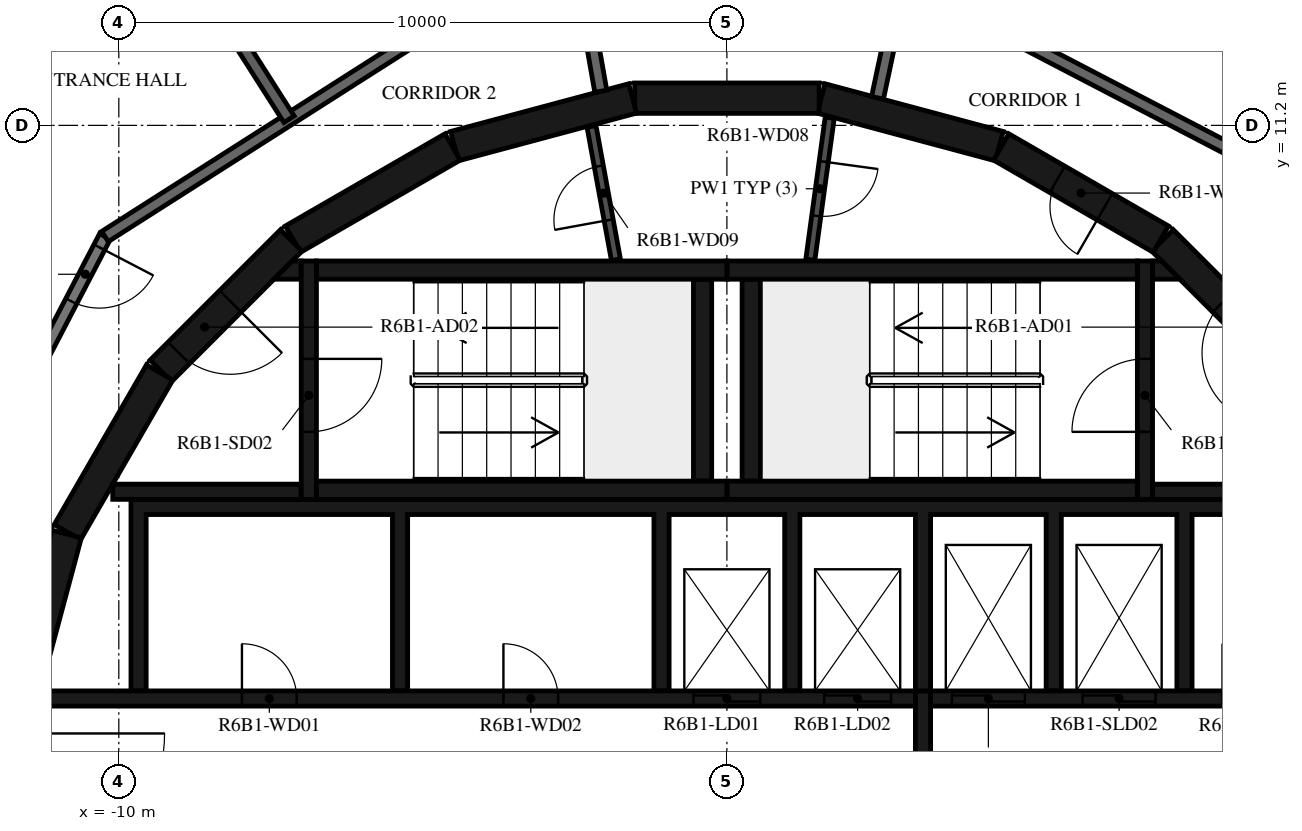
"""IFC4 building model, lengths in metres.
Left out: names, types, materials, properties, quantities, classifications, styles, units other than length and angle.
Written with IfcOpenShell. Run it as: python <this file> out.ifc"""

import sys

from ifc_helpers import new_model, si_unit, direction, frame, frame_2d, origin, place, context, subcontext, project, spatial, polyline, rectangle, outline, extrude, element, fill, save


model = new_model("IFC4")
c1 = context("Model", 3, precision=1e-05, world=origin(), true_north=direction((0.0, 1.0)))
c2 = subcontext(c1, "Body", "Model", "MODEL_VIEW")
j1 = project(units=[si_unit("LENGTHUNIT", "METRE"), si_unit("PLANEANGLEUNIT", "RADIAN")], contexts=[c1])
p1 = place(None, origin())
s1 = spatial("IfcSite", under=j1, at=p1, CompositionType="ELEMENT")
p2 = place(p1, origin())
s2 = spatial("IfcBuilding", under=s1, at=p2, CompositionType="ELEMENT")
p3 = place(p2, frame((0.0, 0.0, 237.2)))
s3 = spatial("IfcBuildingStorey", under=s2, at=p3, CompositionType="ELEMENT", Elevation=237.2)
p4 = place(p3, frame((9.308, 7.164, 0.0), z_axis=(0.0, 0.0, 1.0), x_axis=(-0.707106781187, 0.707106781187, 0.0)))
e1 = element("IfcWall", 1, at=p4, inside=s3, PredefinedType="SHEAR", context=c2, shape_type="SweptSolid", body=[
    extrude(rectangle(XDim=3.032, YDim=0.5, at=frame_2d((1.516, 0.0))), origin(), (0.0, 0.0, 1.0), 3.12),
])
p5 = place(p4, frame((0.416, 0.0, 0.0)))
e2 = element("IfcOpeningElement", 2, at=p5, cuts=e1, PredefinedType="OPENING", context=c2, shape_type="SweptSolid", body=[
    extrude(rectangle(XDim=1.2, YDim=2.1, at=frame_2d((0.6, 1.05))), frame((0.0, 0.26, 0.0), z_axis=(0.0, -1.0, 0.0), x_axis=(1.0, 0.0, 0.0)), (0.0, 0.0, 1.0), 0.52),
])
p6 = place(p3, frame((7.137, 9.329, 0.0), z_axis=(0.0, 0.0, 1.0), x_axis=(-0.865975092491, 0.500087131594, 0.0)))
e3 = element("IfcWall", 3, at=p6, inside=s3, PredefinedType="SHEAR", context=c2, shape_type="SweptSolid", body=[
    extrude(rectangle(XDim=3.033, YDim=0.5, at=frame_2d((1.516, 0.0))), origin(), (0.0, 0.0, 1.0), 3.12),
])
p7 = place(p6, frame((1.066, 0.0, 0.0)))
e4 = element("IfcOpeningElement", 4, at=p7, cuts=e3, PredefinedType="OPENING", context=c2, shape_type="SweptSolid", body=[
    extrude(rectangle(XDim=0.9, YDim=2.1, at=frame_2d((0.45, 1.05))), frame((0.0, 0.26, 0.0), z_axis=(0.0, -1.0, 0.0), x_axis=(1.0, 0.0, 0.0)), (0.0, 0.0, 1.0), 0.52),
])
for number, where, z_axis, x_axis in (
    (5, (4.479, 10.858, 0.0), (0.0, 0.0, 1.0), (-0.966, 0.259, 0.0)),
    (6, (1.516, 11.647, 0.0), (0.0, 0.0, 1.0), (-1.0, 0.0, 0.0)),
    (7, (-1.55, 11.643, 0.0), (0.0, 0.0, 1.0), (-0.966, -0.259, 0.0)),
    (8, (-4.51, 10.845, 0.0), (0.0, 0.0, 1.0), (-0.866, -0.5, 0.0)),
):
    element("IfcWall", number, at=place(p3, frame(where, z_axis=z_axis, x_axis=x_axis)), inside=s3, PredefinedType="SHEAR", context=c2, shape_type="SweptSolid", body=[
        extrude(rectangle(XDim=3.033, YDim=0.5, at=frame_2d((1.516, 0.0))), origin(), (0.0, 0.0, 1.0), 3.12),
    ])
p8 = place(p3, frame((-7.164, 9.308, 0.0), z_axis=(0.0, 0.0, 1.0), x_axis=(-0.707106781187, -0.707106781187, 0.0)))
e9 = element("IfcWall", 9, at=p8, inside=s3, PredefinedType="SHEAR", context=c2, shape_type="SweptSolid", body=[
    extrude(rectangle(XDim=3.032, YDim=0.5, at=frame_2d((1.516, 0.0))), origin(), (0.0, 0.0, 1.0), 3.12),
])
p9 = place(p8, frame((1.416, 0.0, 0.0)))
e10 = element("IfcOpeningElement", 10, at=p9, cuts=e9, PredefinedType="OPENING", context=c2, shape_type="SweptSolid", body=[
    extrude(rectangle(XDim=1.2, YDim=2.1, at=frame_2d((0.6, 1.05))), frame((0.0, 0.26, 0.0), z_axis=(0.0, -1.0, 0.0), x_axis=(1.0, 0.0, 0.0)), (0.0, 0.0, 1.0), 0.52),
])
for number, where, z_axis, x_axis in (
    (11, (-9.329, 7.137, 0.0), (0.0, 0.0, 1.0), (-0.5, -0.866, 0.0)),
    (12, (-10.858, 4.479, 0.0), (0.0, 0.0, 1.0), (-0.259, -0.966, 0.0)),
):
    element("IfcWall", number, at=place(p3, frame(where, z_axis=z_axis, x_axis=x_axis)), inside=s3, PredefinedType="SHEAR", context=c2, shape_type="SweptSolid", body=[
        extrude(rectangle(XDim=3.033, YDim=0.5, at=frame_2d((1.516, 0.0))), origin(), (0.0, 0.0, 1.0), 3.12),
    ])
for number, where, z_axis, x_axis in (
    (13, (0.0, 5.2, 0.0), (0.0, 0.0, 1.0), (1.0, 0.0, 0.0)),
    (14, (0.0, 8.82, 0.0), (0.0, 0.0, 1.0), (1.0, 0.0, 0.0)),
):
    element("IfcWall", number, at=place(p3, frame(where, z_axis=z_axis, x_axis=x_axis)), inside=s3, PredefinedType="SHEAR", context=c2, shape_type="SweptSolid", body=[
        extrude(rectangle(XDim=6.75, YDim=0.3, at=frame_2d((3.375, 0.0))), origin(), (0.0, 0.0, 1.0), 3.12),
    ])
p10 = place(p3, frame((0.4, 5.35, 0.0), z_axis=(0.0, 0.0, 1.0), x_axis=(0.0, 1.0, 0.0)))
e15 = element("IfcWall", 15, at=p10, inside=s3, PredefinedType="SHEAR", context=c2, shape_type="SweptSolid", body=[
    extrude(rectangle(XDim=3.32, YDim=0.3, at=frame_2d((1.66, 0.0))), origin(), (0.0, 0.0, 1.0), 3.12),
])
p11 = place(p3, frame((6.875, 5.05, 0.0), z_axis=(0.0, 0.0, 1.0), x_axis=(0.0, 1.0, 0.0)))
e16 = element("IfcWall", 16, at=p11, inside=s3, PredefinedType="SHEAR", context=c2, shape_type="SweptSolid", body=[
    extrude(rectangle(XDim=3.92, YDim=0.25, at=frame_2d((1.96, 0.0))), origin(), (0.0, 0.0, 1.0), 3.12),
])
p12 = place(p11, frame((1.11, 0.0, 0.0)))
e17 = element("IfcOpeningElement", 17, at=p12, cuts=e16, PredefinedType="OPENING", context=c2, shape_type="SweptSolid", body=[
    extrude(rectangle(XDim=1.2, YDim=2.1, at=frame_2d((0.6, 1.05))), frame((0.0, 0.135, 0.0), z_axis=(0.0, -1.0, 0.0), x_axis=(1.0, 0.0, 0.0)), (0.0, 0.0, 1.0), 0.27),
])
p13 = place(p3, frame((7.0, 5.175, 0.0), z_axis=(0.0, 0.0, 1.0), x_axis=(1.0, 0.0, 0.0)))
e18 = element("IfcWall", 18, at=p13, inside=s3, PredefinedType="SHEAR", context=c2, shape_type="SweptSolid", body=[
    extrude(rectangle(XDim=3.1, YDim=0.25, at=frame_2d((1.55, 0.0))), origin(), (0.0, 0.0, 1.0), 3.12),
])
p14 = place(p3, origin())
e19 = element("IfcWall", 19, at=p14, inside=s3, PredefinedType="SHEAR", context=c2, shape_type="SweptSolid", body=[
    extrude(outline(polyline([(7.448, 8.67), (7.0, 8.67), (7.0, 8.97), (7.148, 8.97), (7.448, 8.67)])), origin(), (0.0, 0.0, 1.0), 3.12),
])
for number, where, z_axis, x_axis in (
    (20, (-6.75, 5.2, 0.0), (0.0, 0.0, 1.0), (1.0, 0.0, 0.0)),
    (21, (-6.75, 8.82, 0.0), (0.0, 0.0, 1.0), (1.0, 0.0, 0.0)),
):
    element("IfcWall", number, at=place(p3, frame(where, z_axis=z_axis, x_axis=x_axis)), inside=s3, PredefinedType="SHEAR", context=c2, shape_type="SweptSolid", body=[
        extrude(rectangle(XDim=6.75, YDim=0.3, at=frame_2d((3.375, 0.0))), origin(), (0.0, 0.0, 1.0), 3.12),
    ])
p15 = place(p3, frame((-0.4, 5.35, 0.0), z_axis=(0.0, 0.0, 1.0), x_axis=(0.0, 1.0, 0.0)))
e22 = element("IfcWall", 22, at=p15, inside=s3, PredefinedType="SHEAR", context=c2, shape_type="SweptSolid", body=[
    extrude(rectangle(XDim=3.32, YDim=0.3, at=frame_2d((1.66, 0.0))), origin(), (0.0, 0.0, 1.0), 3.12),
])
p16 = place(p3, frame((-6.875, 8.97, 0.0), z_axis=(0.0, 0.0, 1.0), x_axis=(0.0, -1.0, 0.0)))
e23 = element("IfcWall", 23, at=p16, inside=s3, PredefinedType="SHEAR", context=c2, shape_type="SweptSolid", body=[
    extrude(rectangle(XDim=3.92, YDim=0.25, at=frame_2d((1.96, 0.0))), origin(), (0.0, 0.0, 1.0), 3.12),
])
p17 = place(p16, frame((1.61, 0.0, 0.0)))
e24 = element("IfcOpeningElement", 24, at=p17, cuts=e23, PredefinedType="OPENING", context=c2, shape_type="SweptSolid", body=[
    extrude(rectangle(XDim=1.2, YDim=2.1, at=frame_2d((0.6, 1.05))), frame((0.0, 0.135, 0.0), z_axis=(0.0, -1.0, 0.0), x_axis=(1.0, 0.0, 0.0)), (0.0, 0.0, 1.0), 0.27),
])
p18 = place(p3, frame((-7.0, 5.175, 0.0), z_axis=(0.0, 0.0, 1.0), x_axis=(-1.0, 0.0, 0.0)))
e25 = element("IfcWall", 25, at=p18, inside=s3, PredefinedType="SHEAR", context=c2, shape_type="SweptSolid", body=[
    extrude(rectangle(XDim=3.1, YDim=0.25, at=frame_2d((1.55, 0.0))), origin(), (0.0, 0.0, 1.0), 3.12),
])
p19 = place(p3, origin())
e26 = element("IfcWall", 26, at=p19, inside=s3, PredefinedType="SHEAR", context=c2, shape_type="SweptSolid", body=[
    extrude(outline(polyline([(-7.148, 8.97), (-7.0, 8.97), (-7.0, 8.67), (-7.448, 8.67), (-7.148, 8.97)])), origin(), (0.0, 0.0, 1.0), 3.12),
])
p20 = place(p3, origin())
e27 = element("IfcWall", 27, at=p20, inside=s3, PredefinedType="SHEAR", context=c2, shape_type="SweptSolid", body=[
    extrude(outline(polyline([(-9.55, 4.8), (-5.5, 4.8), (-5.5, 1.9), (-5.25, 1.9), (-5.25, 4.8), (-1.2, 4.8), (-1.2, 1.9), (-0.95, 1.9), (-0.95, 4.8), (0.95, 4.8), (0.95, 1.9), (1.2, 1.9), (1.2, 4.8), (3.1, 4.8), (3.1, 1.9), (3.35, 1.9), (3.35, 4.8), (5.25, 4.8), (5.25, 1.9), (5.5, 1.9), (5.5, 4.8), (7.4, 4.8), (7.4, 1.9), (7.65, 1.9), (7.65, 4.8), (9.55, 4.8), (9.55, 1.9), (9.8, 1.9), (9.8, 4.8), (9.8, 5.05), (-9.8, 5.05), (-9.8, 4.8), (-9.8, 1.9), (-9.55, 1.9), (-9.55, 4.8)])), origin(), (0.0, 0.0, 1.0), 3.12),
])
p21 = place(p3, frame((-11.28, 1.775, 0.0), z_axis=(0.0, 0.0, 1.0), x_axis=(1.0, 0.0, 0.0)))
e28 = element("IfcWall", 28, at=p21, inside=s3, PredefinedType="SHEAR", context=c2, shape_type="SweptSolid", body=[
    extrude(rectangle(XDim=14.38, YDim=0.25, at=frame_2d((7.19, 0.0))), origin(), (0.0, 0.0, 1.0), 3.12),
])
p22 = place(p21, frame((10.73, 0.0, 0.0)))
e29 = element("IfcOpeningElement", 29, at=p22, cuts=e28, PredefinedType="OPENING", context=c2, shape_type="SweptSolid", body=[
    extrude(rectangle(XDim=1.1, YDim=2.1, at=frame_2d((0.55, 1.05))), frame((0.0, 0.135, 0.0), z_axis=(0.0, -1.0, 0.0), x_axis=(1.0, 0.0, 0.0)), (0.0, 0.0, 1.0), 0.27),
])
p23 = place(p21, frame((12.88, 0.0, 0.0)))
e30 = element("IfcOpeningElement", 30, at=p23, cuts=e28, PredefinedType="OPENING", context=c2, shape_type="SweptSolid", body=[
    extrude(rectangle(XDim=1.1, YDim=2.1, at=frame_2d((0.55, 1.05))), frame((0.0, 0.135, 0.0), z_axis=(0.0, -1.0, 0.0), x_axis=(1.0, 0.0, 0.0)), (0.0, 0.0, 1.0), 0.27),
])
p24 = place(p21, frame((3.305, 0.0, 0.0)))
e31 = element("IfcOpeningElement", 31, at=p24, cuts=e28, PredefinedType="OPENING", context=c2, shape_type="SweptSolid", body=[
    extrude(rectangle(XDim=0.9, YDim=2.1, at=frame_2d((0.45, 1.05))), frame((0.0, 0.135, 0.0), z_axis=(0.0, -1.0, 0.0), x_axis=(1.0, 0.0, 0.0)), (0.0, 0.0, 1.0), 0.27),
])
p25 = place(p21, frame((7.605, 0.0, 0.0)))
e32 = element("IfcOpeningElement", 32, at=p25, cuts=e28, PredefinedType="OPENING", context=c2, shape_type="SweptSolid", body=[
    extrude(rectangle(XDim=0.9, YDim=2.1, at=frame_2d((0.45, 1.05))), frame((0.0, 0.135, 0.0), z_axis=(0.0, -1.0, 0.0), x_axis=(1.0, 0.0, 0.0)), (0.0, 0.0, 1.0), 0.27),
])
p26 = place(p3, frame((3.35, 1.775, 0.0), z_axis=(0.0, 0.0, 1.0), x_axis=(1.0, 0.0, 0.0)))
e33 = element("IfcWall", 33, at=p26, inside=s3, PredefinedType="SHEAR", context=c2, shape_type="SweptSolid", body=[
    extrude(rectangle(XDim=7.93, YDim=0.25, at=frame_2d((3.965, 0.0))), origin(), (0.0, 0.0, 1.0), 3.12),
])
p27 = place(p26, frame((0.35, 0.0, 0.0)))
e34 = element("IfcOpeningElement", 34, at=p27, cuts=e33, PredefinedType="OPENING", context=c2, shape_type="SweptSolid", body=[
    extrude(rectangle(XDim=1.2, YDim=2.4, at=frame_2d((0.6, 1.2))), frame((0.0, 0.135, 0.0), z_axis=(0.0, -1.0, 0.0), x_axis=(1.0, 0.0, 0.0)), (0.0, 0.0, 1.0), 0.27),
])
p28 = place(p26, frame((2.5, 0.0, 0.0)))
e35 = element("IfcOpeningElement", 35, at=p28, cuts=e33, PredefinedType="OPENING", context=c2, shape_type="SweptSolid", body=[
    extrude(rectangle(XDim=1.2, YDim=2.4, at=frame_2d((0.6, 1.2))), frame((0.0, 0.135, 0.0), z_axis=(0.0, -1.0, 0.0), x_axis=(1.0, 0.0, 0.0)), (0.0, 0.0, 1.0), 0.27),
])
p29 = place(p26, frame((4.8, 0.0, 0.0)))
e36 = element("IfcOpeningElement", 36, at=p29, cuts=e33, PredefinedType="OPENING", context=c2, shape_type="SweptSolid", body=[
    extrude(rectangle(XDim=0.9, YDim=2.1, at=frame_2d((0.45, 1.05))), frame((0.0, 0.135, 0.0), z_axis=(0.0, -1.0, 0.0), x_axis=(1.0, 0.0, 0.0)), (0.0, 0.0, 1.0), 0.27),
])
p30 = place(p3, frame((3.225, -1.9, 0.0), z_axis=(0.0, 0.0, 1.0), x_axis=(0.0, 1.0, 0.0)))
e37 = element("IfcWall", 37, at=p30, inside=s3, PredefinedType="SHEAR", context=c2, shape_type="SweptSolid", body=[
    extrude(rectangle(XDim=3.8, YDim=0.25, at=frame_2d((1.9, 0.0))), origin(), (0.0, 0.0, 1.0), 3.12),
])
p31 = place(p3, frame((1.691, 11.326, 0.0), z_axis=(0.0, 0.0, 1.0), x_axis=(-0.135344253201, -0.990798633994, 0.0)))
e38 = element("IfcWall", 38, at=p31, inside=s3, PredefinedType="PARTITIONING", context=c2, shape_type="SweptSolid", body=[
    extrude(rectangle(XDim=2.358, YDim=0.15, at=frame_2d((1.179, 0.0))), origin(), (0.0, 0.0, 1.0), 3.12),
])
p32 = place(p31, frame((0.729, 0.0, 0.0)))
e39 = element("IfcOpeningElement", 39, at=p32, cuts=e38, PredefinedType="OPENING", context=c2, shape_type="SweptSolid", body=[
    extrude(rectangle(XDim=0.9, YDim=2.1, at=frame_2d((0.45, 1.05))), frame((0.0, 0.085, 0.0), z_axis=(0.0, -1.0, 0.0), x_axis=(1.0, 0.0, 0.0)), (0.0, 0.0, 1.0), 0.17),
])
p33 = place(p3, frame((-1.825, 8.99, 0.0), z_axis=(0.0, 0.0, 1.0), x_axis=(-0.179955206115, 0.983674805915, 0.0)))
e40 = element("IfcWall", 40, at=p33, inside=s3, PredefinedType="PARTITIONING", context=c2, shape_type="SweptSolid", body=[
    extrude(rectangle(XDim=2.229, YDim=0.15, at=frame_2d((1.115, 0.0))), origin(), (0.0, 0.0, 1.0), 3.12),
])
p34 = place(p33, frame((0.665, 0.0, 0.0)))
e41 = element("IfcOpeningElement", 41, at=p34, cuts=e40, PredefinedType="OPENING", context=c2, shape_type="SweptSolid", body=[
    extrude(rectangle(XDim=0.9, YDim=2.1, at=frame_2d((0.45, 1.05))), frame((0.0, 0.085, 0.0), z_axis=(0.0, -1.0, 0.0), x_axis=(1.0, 0.0, 0.0)), (0.0, 0.0, 1.0), 0.17),
])
p35 = place(p3, frame((9.372, 10.228, 0.0), z_axis=(0.0, 0.0, 1.0), x_axis=(-0.887005184532, 0.461759464021, 0.0)))
e42 = element("IfcWall", 42, at=p35, inside=s3, PredefinedType="STANDARD", context=c2, shape_type="SweptSolid", body=[
    extrude(rectangle(XDim=7.181, YDim=0.2, at=frame_2d((3.591, 0.0))), origin(), (0.0, 0.0, 1.0), 3.12),
])
p36 = place(p3, frame((2.878, 13.538, 0.0), z_axis=(0.0, 0.0, 1.0), x_axis=(-0.207893604596, -0.978151444904, 0.0)))
e43 = element("IfcWall", 43, at=p36, inside=s3, PredefinedType="STANDARD", context=c2, shape_type="SweptSolid", body=[
    extrude(rectangle(XDim=1.927, YDim=0.2, at=frame_2d((0.963, 0.0))), origin(), (0.0, 0.0, 1.0), 3.12),
])
p37 = place(p3, frame((-10.228, 9.372, 0.0), z_axis=(0.0, 0.0, 1.0), x_axis=(-0.461759464021, -0.887005184532, 0.0)))
e44 = element("IfcWall", 44, at=p37, inside=s3, PredefinedType="STANDARD", context=c2, shape_type="SweptSolid", body=[
    extrude(rectangle(XDim=7.181, YDim=0.2, at=frame_2d((3.591, 0.0))), origin(), (0.0, 0.0, 1.0), 3.12),
])
p38 = place(p37, frame((0.2, 0.0, 0.0)))
e45 = element("IfcOpeningElement", 45, at=p38, cuts=e44, PredefinedType="OPENING", context=c2, shape_type="SweptSolid", body=[
    extrude(rectangle(XDim=1.0, YDim=2.1, at=frame_2d((0.5, 1.05))), frame((0.0, 0.11, 0.0), z_axis=(0.0, -1.0, 0.0), x_axis=(1.0, 0.0, 0.0)), (0.0, 0.0, 1.0), 0.22),
])
p39 = place(p3, frame((-2.074, 11.761, 0.0), z_axis=(0.0, 0.0, 1.0), x_axis=(-0.173679082312, 0.984802303189, 0.0)))
e46 = element("IfcWall", 46, at=p39, inside=s3, PredefinedType="STANDARD", context=c2, shape_type="SweptSolid", body=[
    extrude(rectangle(XDim=1.573, YDim=0.2, at=frame_2d((0.787, 0.0))), origin(), (0.0, 0.0, 1.0), 3.12),
])
p40 = place(p3, frame((-4.172, 13.231, 0.0), z_axis=(0.0, 0.0, 1.0), x_axis=(-0.843388394728, -0.537304397561, 0.0)))
e47 = element("IfcWall", 47, at=p40, inside=s3, PredefinedType="STANDARD", context=c2, shape_type="SweptSolid", body=[
    extrude(rectangle(XDim=7.181, YDim=0.2, at=frame_2d((3.59, 0.0))), origin(), (0.0, 0.0, 1.0), 3.12),
])
p41 = place(p3, frame((-9.645, 15.138, 0.0), z_axis=(0.0, 0.0, 1.0), x_axis=(0.537267800866, -0.84341170857, 0.0)))
e48 = element("IfcWall", 48, at=p41, inside=s3, PredefinedType="STANDARD", context=c2, shape_type="SweptSolid", body=[
    extrude(rectangle(XDim=4.55, YDim=0.2, at=frame_2d((2.275, 0.0))), origin(), (0.0, 0.0, 1.0), 3.12),
])
p42 = place(p3, frame((10.421, 11.373, 0.0), z_axis=(0.0, 0.0, 1.0), x_axis=(-0.887012970857, 0.461744506769, 0.0)))
e49 = element("IfcWall", 49, at=p42, inside=s3, PredefinedType="PARTITIONING", context=c2, shape_type="SweptSolid", body=[
    extrude(rectangle(XDim=7.985, YDim=0.12, at=frame_2d((3.992, 0.0))), origin(), (0.0, 0.0, 1.0), 3.12),
])
p43 = place(p12, origin())
e50 = element("IfcDoor", 50, at=p43, inside=s3, OperationType="SINGLE_SWING_LEFT", PredefinedType="DOOR", context=c2, shape_type="SweptSolid", body=[
    extrude(rectangle(XDim=1.2, YDim=2.1, at=frame_2d((0.6, 1.05))), frame((0.0, 0.025, 0.0), z_axis=(0.0, -1.0, 0.0), x_axis=(1.0, 0.0, 0.0)), (0.0, 0.0, 1.0), 0.05),
])
fill(e17, e50)
p44 = place(p5, origin())
e51 = element("IfcDoor", 51, at=p44, inside=s3, OperationType="SINGLE_SWING_RIGHT", PredefinedType="DOOR", context=c2, shape_type="SweptSolid", body=[
    extrude(rectangle(XDim=1.2, YDim=2.1, at=frame_2d((0.6, 1.05))), frame((0.0, 0.025, 0.0), z_axis=(0.0, -1.0, 0.0), x_axis=(1.0, 0.0, 0.0)), (0.0, 0.0, 1.0), 0.05),
])
fill(e2, e51)
p45 = place(p17, origin())
e52 = element("IfcDoor", 52, at=p45, inside=s3, OperationType="SINGLE_SWING_LEFT", PredefinedType="DOOR", context=c2, shape_type="SweptSolid", body=[
    extrude(rectangle(XDim=1.2, YDim=2.1, at=frame_2d((0.6, 1.05))), frame((0.0, 0.025, 0.0), z_axis=(0.0, -1.0, 0.0), x_axis=(1.0, 0.0, 0.0)), (0.0, 0.0, 1.0), 0.05),
])
fill(e24, e52)
p46 = place(p9, origin())
e53 = element("IfcDoor", 53, at=p46, inside=s3, OperationType="SINGLE_SWING_RIGHT", PredefinedType="DOOR", context=c2, shape_type="SweptSolid", body=[
    extrude(rectangle(XDim=1.2, YDim=2.1, at=frame_2d((0.6, 1.05))), frame((0.0, 0.025, 0.0), z_axis=(0.0, -1.0, 0.0), x_axis=(1.0, 0.0, 0.0)), (0.0, 0.0, 1.0), 0.05),
])
fill(e10, e53)
p47 = place(p22, origin())
e54 = element("IfcDoor", 54, at=p47, inside=s3, OperationType="DOUBLE_DOOR_SLIDING", PredefinedType="DOOR", context=c2, shape_type="SweptSolid", body=[
    extrude(rectangle(XDim=1.1, YDim=2.1, at=frame_2d((0.55, 1.05))), frame((0.0, 0.025, 0.0), z_axis=(0.0, -1.0, 0.0), x_axis=(1.0, 0.0, 0.0)), (0.0, 0.0, 1.0), 0.05),
])
fill(e29, e54)
p48 = place(p23, origin())
e55 = element("IfcDoor", 55, at=p48, inside=s3, OperationType="DOUBLE_DOOR_SLIDING", PredefinedType="DOOR", context=c2, shape_type="SweptSolid", body=[
    extrude(rectangle(XDim=1.1, YDim=2.1, at=frame_2d((0.55, 1.05))), frame((0.0, 0.025, 0.0), z_axis=(0.0, -1.0, 0.0), x_axis=(1.0, 0.0, 0.0)), (0.0, 0.0, 1.0), 0.05),
])
fill(e30, e55)
p49 = place(p27, origin())
e56 = element("IfcDoor", 56, at=p49, inside=s3, OperationType="DOUBLE_DOOR_SLIDING", PredefinedType="DOOR", context=c2, shape_type="SweptSolid", body=[
    extrude(rectangle(XDim=1.2, YDim=2.4, at=frame_2d((0.6, 1.2))), frame((0.0, 0.025, 0.0), z_axis=(0.0, -1.0, 0.0), x_axis=(1.0, 0.0, 0.0)), (0.0, 0.0, 1.0), 0.05),
])
fill(e34, e56)
p50 = place(p28, origin())
e57 = element("IfcDoor", 57, at=p50, inside=s3, OperationType="DOUBLE_DOOR_SLIDING", PredefinedType="DOOR", context=c2, shape_type="SweptSolid", body=[
    extrude(rectangle(XDim=1.2, YDim=2.4, at=frame_2d((0.6, 1.2))), frame((0.0, 0.025, 0.0), z_axis=(0.0, -1.0, 0.0), x_axis=(1.0, 0.0, 0.0)), (0.0, 0.0, 1.0), 0.05),
])
fill(e35, e57)
p51 = place(p24, origin())
e58 = element("IfcDoor", 58, at=p51, inside=s3, OperationType="SINGLE_SWING_LEFT", PredefinedType="DOOR", context=c2, shape_type="SweptSolid", body=[
    extrude(rectangle(XDim=0.9, YDim=2.1, at=frame_2d((0.45, 1.05))), frame((0.0, 0.025, 0.0), z_axis=(0.0, -1.0, 0.0), x_axis=(1.0, 0.0, 0.0)), (0.0, 0.0, 1.0), 0.05),
])
fill(e31, e58)
p52 = place(p25, origin())
e59 = element("IfcDoor", 59, at=p52, inside=s3, OperationType="SINGLE_SWING_RIGHT", PredefinedType="DOOR", context=c2, shape_type="SweptSolid", body=[
    extrude(rectangle(XDim=0.9, YDim=2.1, at=frame_2d((0.45, 1.05))), frame((0.0, 0.025, 0.0), z_axis=(0.0, -1.0, 0.0), x_axis=(1.0, 0.0, 0.0)), (0.0, 0.0, 1.0), 0.05),
])
fill(e32, e59)
p53 = place(p32, origin())
e60 = element("IfcDoor", 60, at=p53, inside=s3, OperationType="SINGLE_SWING_RIGHT", PredefinedType="DOOR", context=c2, shape_type="SweptSolid", body=[
    extrude(rectangle(XDim=0.9, YDim=2.1, at=frame_2d((0.45, 1.05))), frame((0.0, 0.025, 0.0), z_axis=(0.0, -1.0, 0.0), x_axis=(1.0, 0.0, 0.0)), (0.0, 0.0, 1.0), 0.05),
])
fill(e39, e60)
p54 = place(p34, origin())
e61 = element("IfcDoor", 61, at=p54, inside=s3, OperationType="SINGLE_SWING_LEFT", PredefinedType="DOOR", context=c2, shape_type="SweptSolid", body=[
    extrude(rectangle(XDim=0.9, YDim=2.1, at=frame_2d((0.45, 1.05))), frame((0.0, 0.025, 0.0), z_axis=(0.0, -1.0, 0.0), x_axis=(1.0, 0.0, 0.0)), (0.0, 0.0, 1.0), 0.05),
])
fill(e41, e61)
p55 = place(p7, origin())
e62 = element("IfcDoor", 62, at=p55, inside=s3, OperationType="SINGLE_SWING_RIGHT", PredefinedType="DOOR", context=c2, shape_type="SweptSolid", body=[
    extrude(rectangle(XDim=0.9, YDim=2.1, at=frame_2d((0.45, 1.05))), frame((0.0, 0.025, 0.0), z_axis=(0.0, -1.0, 0.0), x_axis=(1.0, 0.0, 0.0)), (0.0, 0.0, 1.0), 0.05),
])
fill(e4, e62)
p56 = place(p38, origin())
e63 = element("IfcDoor", 63, at=p56, inside=s3, OperationType="SINGLE_SWING_LEFT", PredefinedType="DOOR", context=c2, shape_type="SweptSolid", body=[
    extrude(rectangle(XDim=1.0, YDim=2.1, at=frame_2d((0.5, 1.05))), frame((0.0, 0.025, 0.0), z_axis=(0.0, -1.0, 0.0), x_axis=(1.0, 0.0, 0.0)), (0.0, 0.0, 1.0), 0.05),
])
fill(e45, e63)
save(model, sys.argv[1])
